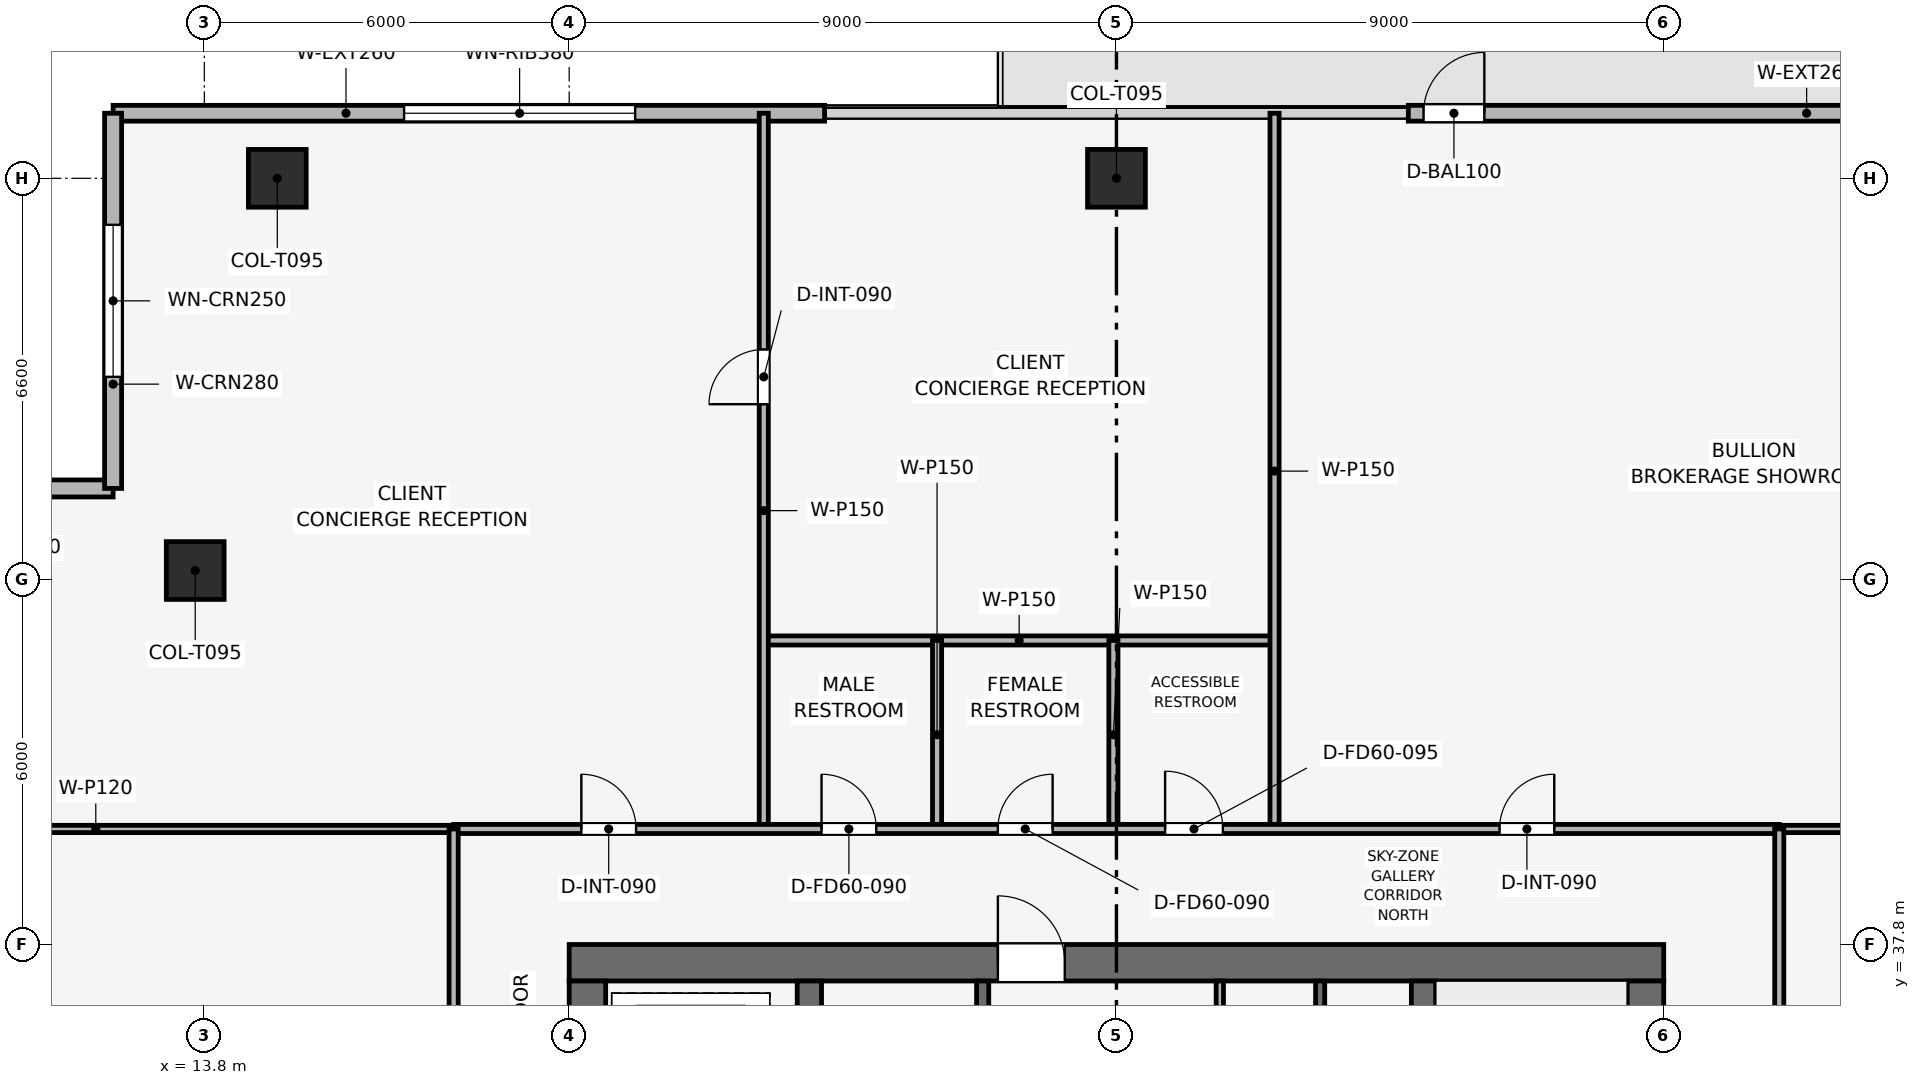
"""IFC4 building model, lengths in metres.
Left out: names, types, materials, properties, quantities, classifications, styles, units other than length and angle.
Written with IfcOpenShell. Run it as: python <this file> out.ifc"""

import sys

from ifc_helpers import new_model, si_unit, direction, frame, frame_2d, origin, origin_2d, place, context, subcontext, project, spatial, rectangle, extrude, element, fill, save


model = new_model("IFC4")
c1 = context("Model", 3, precision=1e-05, world=origin(), true_north=direction((0.0, 1.0)))
c2 = subcontext(c1, "Body", "Model", "MODEL_VIEW")
j1 = project(units=[si_unit("LENGTHUNIT", "METRE"), si_unit("PLANEANGLEUNIT", "RADIAN")], contexts=[c1])
p1 = place(None, origin())
s1 = spatial("IfcSite", under=j1, at=p1, CompositionType="ELEMENT")
p2 = place(p1, origin())
s2 = spatial("IfcBuilding", under=s1, at=p2, CompositionType="ELEMENT")
p3 = place(p2, frame((0.0, 0.0, 303.0)))
s3 = spatial("IfcBuildingStorey", under=s2, at=p3, CompositionType="ELEMENT", Elevation=303.0)
p4 = place(p3, frame((19.8, 37.5, 0.0), z_axis=(0.0, 0.0, 1.0), x_axis=(1.0, 0.0, 0.0)))
e1 = element("IfcWall", 1, at=p4, inside=s3, PredefinedType="SHEAR", context=c2, shape_type="SweptSolid", body=[
    extrude(rectangle(XDim=18.0, YDim=0.6, at=frame_2d((9.0, 0.0))), origin(), (0.0, 0.0, 1.0), 3.75),
])
p5 = place(p4, frame((7.05, 0.0, 0.0)))
e2 = element("IfcOpeningElement", 2, at=p5, cuts=e1, PredefinedType="OPENING", context=c2, shape_type="SweptSolid", body=[
    extrude(rectangle(XDim=1.1, YDim=2.15, at=frame_2d((0.55, 1.075))), frame((0.0, 0.31, 0.0), z_axis=(0.0, -1.0, 0.0), x_axis=(1.0, 0.0, 0.0)), (0.0, 0.0, 1.0), 0.62),
])
p6 = place(p3, frame((20.1, 20.4, 0.0), z_axis=(0.0, 0.0, 1.0), x_axis=(0.0, 1.0, 0.0)))
e3 = element("IfcWall", 3, at=p6, inside=s3, PredefinedType="SHEAR", context=c2, shape_type="SweptSolid", body=[
    extrude(rectangle(XDim=16.8, YDim=0.6, at=frame_2d((8.4, 0.0))), origin(), (0.0, 0.0, 1.0), 3.75),
])
p7 = place(p6, frame((10.4, 0.0, 0.0)))
e4 = element("IfcOpeningElement", 4, at=p7, cuts=e3, PredefinedType="OPENING", context=c2, shape_type="SweptSolid", body=[
    extrude(rectangle(XDim=1.1, YDim=2.15, at=frame_2d((0.55, 1.075))), frame((0.0, 0.31, 0.0), z_axis=(0.0, -1.0, 0.0), x_axis=(1.0, 0.0, 0.0)), (0.0, 0.0, 1.0), 0.62),
])
p8 = place(p3, frame((37.5, 20.4, 0.0), z_axis=(0.0, 0.0, 1.0), x_axis=(0.0, 1.0, 0.0)))
e5 = element("IfcWall", 5, at=p8, inside=s3, PredefinedType="SHEAR", context=c2, shape_type="SweptSolid", body=[
    extrude(rectangle(XDim=16.8, YDim=0.6, at=frame_2d((8.4, 0.0))), origin(), (0.0, 0.0, 1.0), 3.75),
])
p9 = place(p8, frame((4.9, 0.0, 0.0)))
e6 = element("IfcOpeningElement", 6, at=p9, cuts=e5, PredefinedType="OPENING", context=c2, shape_type="SweptSolid", body=[
    extrude(rectangle(XDim=1.1, YDim=2.15, at=frame_2d((0.55, 1.075))), frame((0.0, 0.31, 0.0), z_axis=(0.0, -1.0, 0.0), x_axis=(1.0, 0.0, 0.0)), (0.0, 0.0, 1.0), 0.62),
])
for number, where, z_axis, x_axis in (
    (7, (23.75, 20.4, 0.0), (0.0, 0.0, 1.0), (0.0, 1.0, 0.0)),
    (8, (33.85, 20.4, 0.0), (0.0, 0.0, 1.0), (0.0, 1.0, 0.0)),
):
    element("IfcWall", number, at=place(p3, frame(where, z_axis=z_axis, x_axis=x_axis)), inside=s3, PredefinedType="SHEAR", context=c2, shape_type="SweptSolid", body=[
        extrude(rectangle(XDim=16.8, YDim=0.4, at=frame_2d((8.4, 0.0))), origin(), (0.0, 0.0, 1.0), 3.75),
    ])
for number, where, z_axis, x_axis in (
    (9, (28.8, 50.4, 0.003), (0.0, 0.0, 1.0), (1.0, 0.0, 0.0)),
    (10, (15.0, 50.4, 0.003), (0.0, 0.0, 1.0), (1.0, 0.0, 0.0)),
    (11, (13.65, 43.95, 0.003), (0.0, 0.0, 1.0), (1.0, 0.0, 0.0)),
):
    element("IfcColumn", number, at=place(p3, frame(where, z_axis=z_axis, x_axis=x_axis)), inside=s3, PredefinedType="COLUMN", context=c2, shape_type="SweptSolid", body=[
        extrude(rectangle(XDim=0.95, YDim=0.95, at=origin_2d()), origin(), (0.0, 0.0, 1.0), 3.504),
    ])
p10 = place(p3, frame((12.3, 51.47, 0.0), z_axis=(0.0, 0.0, 1.0), x_axis=(1.0, 0.0, 0.0)))
e12 = element("IfcWall", 12, at=p10, inside=s3, PredefinedType="SOLIDWALL", context=c2, shape_type="SweptSolid", body=[
    extrude(rectangle(XDim=11.7, YDim=0.26, at=frame_2d((5.85, 0.0))), origin(), (0.0, 0.0, 1.0), 3.51),
])
p11 = place(p10, frame((4.785, 0.0, 0.9)))
e13 = element("IfcOpeningElement", 13, at=p11, cuts=e12, PredefinedType="OPENING", context=c2, shape_type="SweptSolid", body=[
    extrude(rectangle(XDim=3.8, YDim=1.9, at=frame_2d((1.9, 0.95))), frame((0.0, 0.14, 0.0), z_axis=(0.0, -1.0, 0.0), x_axis=(1.0, 0.0, 0.0)), (0.0, 0.0, 1.0), 0.28),
])
p12 = place(p3, frame((33.6, 51.47, 0.0), z_axis=(0.0, 0.0, 1.0), x_axis=(1.0, 0.0, 0.0)))
e14 = element("IfcWall", 14, at=p12, inside=s3, PredefinedType="SOLIDWALL", context=c2, shape_type="SweptSolid", body=[
    extrude(rectangle(XDim=11.7, YDim=0.26, at=frame_2d((5.85, 0.0))), origin(), (0.0, 0.0, 1.0), 3.51),
])
p13 = place(p12, frame((0.25, 0.0, 0.0)))
e15 = element("IfcOpeningElement", 15, at=p13, cuts=e14, PredefinedType="OPENING", context=c2, shape_type="SweptSolid", body=[
    extrude(rectangle(XDim=1.0, YDim=2.2, at=frame_2d((0.5, 1.1))), frame((0.0, 0.14, 0.0), z_axis=(0.0, -1.0, 0.0), x_axis=(1.0, 0.0, 0.0)), (0.0, 0.0, 1.0), 0.28),
])
p14 = place(p3, frame((6.13, 45.3, 0.0), z_axis=(0.0, 0.0, 1.0), x_axis=(1.0, 0.0, 0.0)))
e16 = element("IfcWall", 16, at=p14, inside=s3, PredefinedType="SOLIDWALL", context=c2, shape_type="SweptSolid", body=[
    extrude(rectangle(XDim=6.17, YDim=0.28, at=frame_2d((3.085, 0.0))), origin(), (0.0, 0.0, 1.0), 3.51),
])
p15 = place(p14, frame((1.835, 0.0, 0.9)))
e17 = element("IfcOpeningElement", 17, at=p15, cuts=e16, PredefinedType="OPENING", context=c2, shape_type="SweptSolid", body=[
    extrude(rectangle(XDim=2.5, YDim=1.9, at=frame_2d((1.25, 0.95))), frame((0.0, 0.15, 0.0), z_axis=(0.0, -1.0, 0.0), x_axis=(1.0, 0.0, 0.0)), (0.0, 0.0, 1.0), 0.3),
])
p16 = place(p3, frame((12.3, 45.3, 0.0), z_axis=(0.0, 0.0, 1.0), x_axis=(0.0, 1.0, 0.0)))
e18 = element("IfcWall", 18, at=p16, inside=s3, PredefinedType="SOLIDWALL", context=c2, shape_type="SweptSolid", body=[
    extrude(rectangle(XDim=6.17, YDim=0.28, at=frame_2d((3.085, 0.0))), origin(), (0.0, 0.0, 1.0), 3.51),
])
p17 = place(p16, frame((1.835, 0.0, 0.9)))
e19 = element("IfcOpeningElement", 19, at=p17, cuts=e18, PredefinedType="OPENING", context=c2, shape_type="SweptSolid", body=[
    extrude(rectangle(XDim=2.5, YDim=1.9, at=frame_2d((1.25, 0.95))), frame((0.0, 0.15, 0.0), z_axis=(0.0, -1.0, 0.0), x_axis=(1.0, 0.0, 0.0)), (0.0, 0.0, 1.0), 0.3),
])
p18 = place(p3, frame((32.15, 34.0, 0.0), z_axis=(0.0, 0.0, 1.0), x_axis=(0.0, 1.0, 0.0)))
e20 = element("IfcWall", 20, at=p18, inside=s3, PredefinedType="SHEAR", context=c2, shape_type="SweptSolid", body=[
    extrude(rectangle(XDim=3.2, YDim=0.15, at=frame_2d((1.6, 0.0))), origin(), (0.0, 0.0, 1.0), 3.51),
])
p19 = place(p3, frame((26.6, 34.0, 0.0), z_axis=(0.0, 0.0, 1.0), x_axis=(0.0, 1.0, 0.0)))
e21 = element("IfcWall", 21, at=p19, inside=s3, PredefinedType="SHEAR", context=c2, shape_type="SweptSolid", body=[
    extrude(rectangle(XDim=3.2, YDim=0.2, at=frame_2d((1.6, 0.0))), origin(), (0.0, 0.0, 1.0), 3.51),
])
p20 = place(p19, frame((0.75, 0.0, 0.0)))
e22 = element("IfcOpeningElement", 22, at=p20, cuts=e21, PredefinedType="OPENING", context=c2, shape_type="SweptSolid", body=[
    extrude(rectangle(XDim=1.1, YDim=2.15, at=frame_2d((0.55, 1.075))), frame((0.0, 0.11, 0.0), z_axis=(0.0, -1.0, 0.0), x_axis=(1.0, 0.0, 0.0)), (0.0, 0.0, 1.0), 0.22),
])
p21 = place(p3, frame((30.5, 33.925, 0.0), z_axis=(0.0, 0.0, 1.0), x_axis=(0.0, 1.0, 0.0)))
e23 = element("IfcWall", 23, at=p21, inside=s3, PredefinedType="PARTITIONING", context=c2, shape_type="SweptSolid", body=[
    extrude(rectangle(XDim=3.275, YDim=0.12, at=frame_2d((1.637, 0.0))), origin(), (0.0, 0.0, 1.0), 3.51),
])
p22 = place(p21, frame((0.85, 0.0, 0.0)))
e24 = element("IfcOpeningElement", 24, at=p22, cuts=e23, PredefinedType="OPENING", context=c2, shape_type="SweptSolid", body=[
    extrude(rectangle(XDim=0.9, YDim=2.1, at=frame_2d((0.45, 1.05))), frame((0.0, 0.07, 0.0), z_axis=(0.0, -1.0, 0.0), x_axis=(1.0, 0.0, 0.0)), (0.0, 0.0, 1.0), 0.14),
])
p23 = place(p3, frame((23.0, 42.8, 0.0), z_axis=(0.0, 0.0, 1.0), x_axis=(1.0, 0.0, 0.0)))
e25 = element("IfcWall", 25, at=p23, inside=s3, PredefinedType="PARTITIONING", context=c2, shape_type="SweptSolid", body=[
    extrude(rectangle(XDim=8.4, YDim=0.15, at=frame_2d((4.2, 0.0))), origin(), (0.0, 0.0, 1.0), 3.095),
])
p24 = place(p3, frame((23.0, 39.7, 0.0), z_axis=(0.0, 0.0, 1.0), x_axis=(0.0, 1.0, 0.0)))
e26 = element("IfcWall", 26, at=p24, inside=s3, PredefinedType="PARTITIONING", context=c2, shape_type="SweptSolid", body=[
    extrude(rectangle(XDim=11.77, YDim=0.15, at=frame_2d((5.885, 0.0))), origin(), (0.0, 0.0, 1.0), 3.135),
])
p25 = place(p24, frame((6.985, 0.0, 0.0)))
e27 = element("IfcOpeningElement", 27, at=p25, cuts=e26, PredefinedType="OPENING", context=c2, shape_type="SweptSolid", body=[
    extrude(rectangle(XDim=0.9, YDim=2.1, at=frame_2d((0.45, 1.05))), frame((0.0, 0.085, 0.0), z_axis=(0.0, -1.0, 0.0), x_axis=(1.0, 0.0, 0.0)), (0.0, 0.0, 1.0), 0.17),
])
p26 = place(p3, frame((31.4, 39.7, 0.0), z_axis=(0.0, 0.0, 1.0), x_axis=(0.0, 1.0, 0.0)))
e28 = element("IfcWall", 28, at=p26, inside=s3, PredefinedType="PARTITIONING", context=c2, shape_type="SweptSolid", body=[
    extrude(rectangle(XDim=11.77, YDim=0.15, at=frame_2d((5.885, 0.0))), origin(), (0.0, 0.0, 1.0), 3.135),
])
p27 = place(p3, frame((25.85, 39.7, 0.0), z_axis=(0.0, 0.0, 1.0), x_axis=(0.0, 1.0, 0.0)))
e29 = element("IfcWall", 29, at=p27, inside=s3, PredefinedType="PARTITIONING", context=c2, shape_type="SweptSolid", body=[
    extrude(rectangle(XDim=3.1, YDim=0.15, at=frame_2d((1.55, 0.0))), origin(), (0.0, 0.0, 1.0), 3.135),
])
p28 = place(p3, frame((28.75, 39.7, 0.0), z_axis=(0.0, 0.0, 1.0), x_axis=(0.0, 1.0, 0.0)))
e30 = element("IfcWall", 30, at=p28, inside=s3, PredefinedType="PARTITIONING", context=c2, shape_type="SweptSolid", body=[
    extrude(rectangle(XDim=3.1, YDim=0.15, at=frame_2d((1.55, 0.0))), origin(), (0.0, 0.0, 1.0), 3.095),
])
for number, where, z_axis, x_axis in (
    (31, (6.13, 39.7, 0.0), (0.0, 0.0, 1.0), (1.0, 0.0, 0.0)),
    (32, (39.7, 39.7, 0.0), (0.0, 0.0, 1.0), (1.0, 0.0, 0.0)),
):
    element("IfcWall", number, at=place(p3, frame(where, z_axis=z_axis, x_axis=x_axis)), inside=s3, PredefinedType="PARTITIONING", context=c2, shape_type="SweptSolid", body=[
        extrude(rectangle(XDim=11.77, YDim=0.12, at=frame_2d((5.885, 0.0))), origin(), (0.0, 0.0, 1.0), 3.095),
    ])
p29 = place(p3, frame((17.9, 39.7, 0.0), z_axis=(0.0, 0.0, 1.0), x_axis=(1.0, 0.0, 0.0)))
e33 = element("IfcWall", 33, at=p29, inside=s3, PredefinedType="PARTITIONING", context=c2, shape_type="SweptSolid", body=[
    extrude(rectangle(XDim=21.8, YDim=0.15, at=frame_2d((10.9, 0.0))), origin(), (0.0, 0.0, 1.0), 3.095),
])
p30 = place(p29, frame((2.1, 0.0, 0.0)))
e34 = element("IfcOpeningElement", 34, at=p30, cuts=e33, PredefinedType="OPENING", context=c2, shape_type="SweptSolid", body=[
    extrude(rectangle(XDim=0.9, YDim=2.1, at=frame_2d((0.45, 1.05))), frame((0.0, 0.085, 0.0), z_axis=(0.0, -1.0, 0.0), x_axis=(1.0, 0.0, 0.0)), (0.0, 0.0, 1.0), 0.17),
])
p31 = place(p29, frame((6.05, 0.0, 0.0)))
e35 = element("IfcOpeningElement", 35, at=p31, cuts=e33, PredefinedType="OPENING", context=c2, shape_type="SweptSolid", body=[
    extrude(rectangle(XDim=0.9, YDim=2.1, at=frame_2d((0.45, 1.05))), frame((0.0, 0.085, 0.0), z_axis=(0.0, -1.0, 0.0), x_axis=(1.0, 0.0, 0.0)), (0.0, 0.0, 1.0), 0.17),
])
p32 = place(p29, frame((8.95, 0.0, 0.0)))
e36 = element("IfcOpeningElement", 36, at=p32, cuts=e33, PredefinedType="OPENING", context=c2, shape_type="SweptSolid", body=[
    extrude(rectangle(XDim=0.9, YDim=2.1, at=frame_2d((0.45, 1.05))), frame((0.0, 0.085, 0.0), z_axis=(0.0, -1.0, 0.0), x_axis=(1.0, 0.0, 0.0)), (0.0, 0.0, 1.0), 0.17),
])
p33 = place(p29, frame((11.7, 0.0, 0.0)))
e37 = element("IfcOpeningElement", 37, at=p33, cuts=e33, PredefinedType="OPENING", context=c2, shape_type="SweptSolid", body=[
    extrude(rectangle(XDim=0.95, YDim=2.1, at=frame_2d((0.475, 1.05))), frame((0.0, 0.085, 0.0), z_axis=(0.0, -1.0, 0.0), x_axis=(1.0, 0.0, 0.0)), (0.0, 0.0, 1.0), 0.17),
])
p34 = place(p29, frame((17.2, 0.0, 0.0)))
e38 = element("IfcOpeningElement", 38, at=p34, cuts=e33, PredefinedType="OPENING", context=c2, shape_type="SweptSolid", body=[
    extrude(rectangle(XDim=0.9, YDim=2.1, at=frame_2d((0.45, 1.05))), frame((0.0, 0.085, 0.0), z_axis=(0.0, -1.0, 0.0), x_axis=(1.0, 0.0, 0.0)), (0.0, 0.0, 1.0), 0.17),
])
p35 = place(p3, frame((17.9, 12.3, 0.0), z_axis=(0.0, 0.0, 1.0), x_axis=(0.0, 1.0, 0.0)))
e39 = element("IfcWall", 39, at=p35, inside=s3, PredefinedType="PARTITIONING", context=c2, shape_type="SweptSolid", body=[
    extrude(rectangle(XDim=27.4, YDim=0.15, at=frame_2d((13.7, 0.0))), origin(), (0.0, 0.0, 1.0), 3.095),
])
p36 = place(p35, frame((13.25, 0.0, 0.0)))
e40 = element("IfcOpeningElement", 40, at=p36, cuts=e39, PredefinedType="OPENING", context=c2, shape_type="SweptSolid", body=[
    extrude(rectangle(XDim=0.9, YDim=2.1, at=frame_2d((0.45, 1.05))), frame((0.0, 0.085, 0.0), z_axis=(0.0, -1.0, 0.0), x_axis=(1.0, 0.0, 0.0)), (0.0, 0.0, 1.0), 0.17),
])
p37 = place(p3, frame((39.7, 24.4, 0.0), z_axis=(0.0, 0.0, 1.0), x_axis=(0.0, 1.0, 0.0)))
e41 = element("IfcWall", 41, at=p37, inside=s3, PredefinedType="PARTITIONING", context=c2, shape_type="SweptSolid", body=[
    extrude(rectangle(XDim=15.3, YDim=0.15, at=frame_2d((7.65, 0.0))), origin(), (0.0, 0.0, 1.0), 3.095),
])
p38 = place(p37, frame((0.7, 0.0, 0.0)))
e42 = element("IfcOpeningElement", 42, at=p38, cuts=e41, PredefinedType="OPENING", context=c2, shape_type="SweptSolid", body=[
    extrude(rectangle(XDim=0.9, YDim=2.1, at=frame_2d((0.45, 1.05))), frame((0.0, 0.085, 0.0), z_axis=(0.0, -1.0, 0.0), x_axis=(1.0, 0.0, 0.0)), (0.0, 0.0, 1.0), 0.17),
])
p39 = place(p37, frame((4.148, 0.0, 0.0)))
e43 = element("IfcOpeningElement", 43, at=p39, cuts=e41, PredefinedType="OPENING", context=c2, shape_type="SweptSolid", body=[
    extrude(rectangle(XDim=0.9, YDim=2.1, at=frame_2d((0.45, 1.05))), frame((0.0, 0.085, 0.0), z_axis=(0.0, -1.0, 0.0), x_axis=(1.0, 0.0, 0.0)), (0.0, 0.0, 1.0), 0.17),
])
p40 = place(p37, frame((10.648, 0.0, 0.0)))
e44 = element("IfcOpeningElement", 44, at=p40, cuts=e41, PredefinedType="OPENING", context=c2, shape_type="SweptSolid", body=[
    extrude(rectangle(XDim=0.9, YDim=2.1, at=frame_2d((0.45, 1.05))), frame((0.0, 0.085, 0.0), z_axis=(0.0, -1.0, 0.0), x_axis=(1.0, 0.0, 0.0)), (0.0, 0.0, 1.0), 0.17),
])
p41 = place(p13, origin())
e45 = element("IfcDoor", 45, at=p41, inside=s3, OperationType="SINGLE_SWING_RIGHT", PredefinedType="DOOR", context=c2, shape_type="SweptSolid", body=[
    extrude(rectangle(XDim=1.0, YDim=2.2, at=frame_2d((0.5, 1.1))), frame((0.0, 0.025, 0.0), z_axis=(0.0, -1.0, 0.0), x_axis=(1.0, 0.0, 0.0)), (0.0, 0.0, 1.0), 0.05),
])
fill(e15, e45)
p42 = place(p11, origin())
e46 = element("IfcWindow", 46, at=p42, inside=s3, PartitioningType="SINGLE_PANEL", PredefinedType="WINDOW", context=c2, shape_type="SweptSolid", body=[
    extrude(rectangle(XDim=3.8, YDim=1.9, at=frame_2d((1.9, 0.95))), frame((0.0, 0.03, 0.0), z_axis=(0.0, -1.0, 0.0), x_axis=(1.0, 0.0, 0.0)), (0.0, 0.0, 1.0), 0.06),
])
fill(e13, e46)
p43 = place(p17, origin())
e47 = element("IfcWindow", 47, at=p43, inside=s3, PartitioningType="SINGLE_PANEL", PredefinedType="WINDOW", context=c2, shape_type="SweptSolid", body=[
    extrude(rectangle(XDim=2.5, YDim=1.9, at=frame_2d((1.25, 0.95))), frame((0.0, 0.03, 0.0), z_axis=(0.0, -1.0, 0.0), x_axis=(1.0, 0.0, 0.0)), (0.0, 0.0, 1.0), 0.06),
])
fill(e19, e47)
p44 = place(p25, origin())
e48 = element("IfcDoor", 48, at=p44, inside=s3, OperationType="SINGLE_SWING_LEFT", PredefinedType="DOOR", context=c2, shape_type="SweptSolid", body=[
    extrude(rectangle(XDim=0.9, YDim=2.1, at=frame_2d((0.45, 1.05))), frame((0.0, 0.025, 0.0), z_axis=(0.0, -1.0, 0.0), x_axis=(1.0, 0.0, 0.0)), (0.0, 0.0, 1.0), 0.05),
])
fill(e27, e48)
p45 = place(p30, origin())
e49 = element("IfcDoor", 49, at=p45, inside=s3, OperationType="SINGLE_SWING_LEFT", PredefinedType="DOOR", context=c2, shape_type="SweptSolid", body=[
    extrude(rectangle(XDim=0.9, YDim=2.1, at=frame_2d((0.45, 1.05))), frame((0.0, 0.025, 0.0), z_axis=(0.0, -1.0, 0.0), x_axis=(1.0, 0.0, 0.0)), (0.0, 0.0, 1.0), 0.05),
])
fill(e34, e49)
p46 = place(p31, origin())
e50 = element("IfcDoor", 50, at=p46, inside=s3, OperationType="SINGLE_SWING_LEFT", PredefinedType="DOOR", context=c2, shape_type="SweptSolid", body=[
    extrude(rectangle(XDim=0.9, YDim=2.1, at=frame_2d((0.45, 1.05))), frame((0.0, 0.025, 0.0), z_axis=(0.0, -1.0, 0.0), x_axis=(1.0, 0.0, 0.0)), (0.0, 0.0, 1.0), 0.05),
])
fill(e35, e50)
p47 = place(p32, origin())
e51 = element("IfcDoor", 51, at=p47, inside=s3, OperationType="SINGLE_SWING_RIGHT", PredefinedType="DOOR", context=c2, shape_type="SweptSolid", body=[
    extrude(rectangle(XDim=0.9, YDim=2.1, at=frame_2d((0.45, 1.05))), frame((0.0, 0.025, 0.0), z_axis=(0.0, -1.0, 0.0), x_axis=(1.0, 0.0, 0.0)), (0.0, 0.0, 1.0), 0.05),
])
fill(e36, e51)
p48 = place(p33, origin())
e52 = element("IfcDoor", 52, at=p48, inside=s3, OperationType="SINGLE_SWING_LEFT", PredefinedType="DOOR", context=c2, shape_type="SweptSolid", body=[
    extrude(rectangle(XDim=0.95, YDim=2.1, at=frame_2d((0.475, 1.05))), frame((0.0, 0.025, 0.0), z_axis=(0.0, -1.0, 0.0), x_axis=(1.0, 0.0, 0.0)), (0.0, 0.0, 1.0), 0.05),
])
fill(e37, e52)
p49 = place(p34, origin())
e53 = element("IfcDoor", 53, at=p49, inside=s3, OperationType="SINGLE_SWING_RIGHT", PredefinedType="DOOR", context=c2, shape_type="SweptSolid", body=[
    extrude(rectangle(XDim=0.9, YDim=2.1, at=frame_2d((0.45, 1.05))), frame((0.0, 0.025, 0.0), z_axis=(0.0, -1.0, 0.0), x_axis=(1.0, 0.0, 0.0)), (0.0, 0.0, 1.0), 0.05),
])
fill(e38, e53)
p50 = place(p5, origin())
e54 = element("IfcDoor", 54, at=p50, inside=s3, OperationType="SINGLE_SWING_LEFT", PredefinedType="DOOR", context=c2, shape_type="SweptSolid", body=[
    extrude(rectangle(XDim=1.1, YDim=2.15, at=frame_2d((0.55, 1.075))), frame((0.0, 0.025, 0.0), z_axis=(0.0, -1.0, 0.0), x_axis=(1.0, 0.0, 0.0)), (0.0, 0.0, 1.0), 0.05),
])
fill(e2, e54)
save(model, sys.argv[1])
